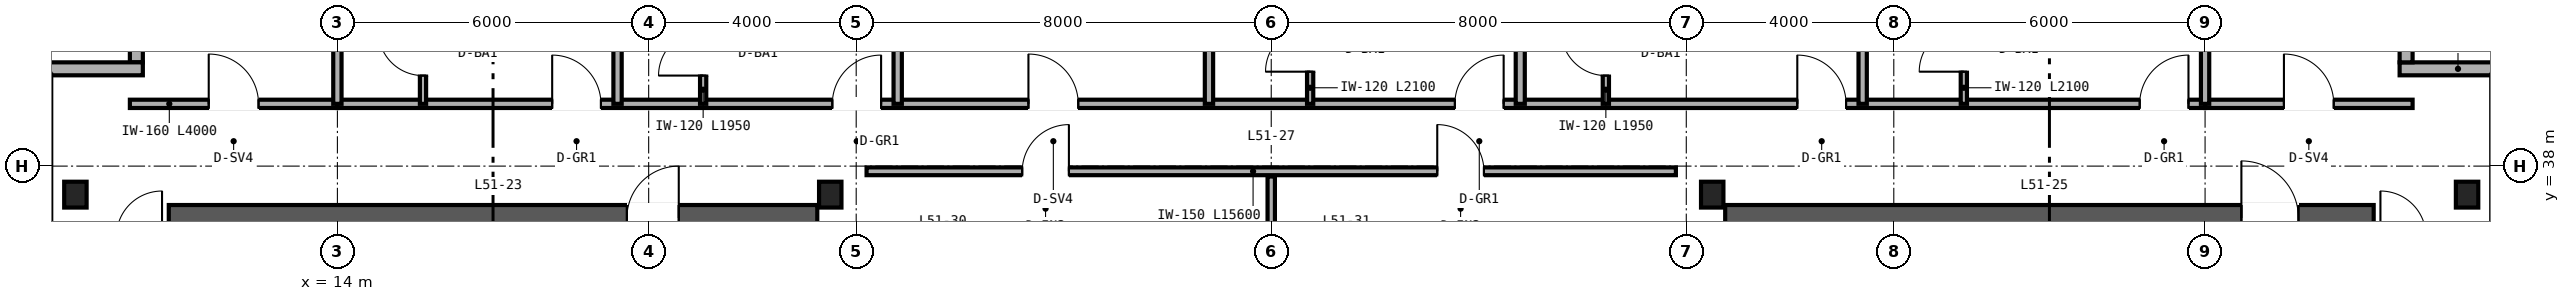
"""IFC4 building model, lengths in metres.
Left out: names, types, materials, properties, quantities, classifications, styles, units other than length and angle.
Written with IfcOpenShell. Run it as: python <this file> out.ifc"""

import sys

from ifc_helpers import new_model, si_unit, direction, frame, frame_2d, origin, origin_2d, place, context, subcontext, project, spatial, rectangle, i_section, extrude, source, transform, mapped, element, fill, save


model = new_model("IFC4")
c1 = context("Model", 3, precision=1e-05, world=origin(), true_north=direction((0.0, 1.0)))
c2 = subcontext(c1, "Body", "Model", "MODEL_VIEW")
j1 = project(units=[si_unit("LENGTHUNIT", "METRE"), si_unit("PLANEANGLEUNIT", "RADIAN")], contexts=[c1])
p1 = place(None, origin())
s1 = spatial("IfcSite", under=j1, at=p1, CompositionType="ELEMENT")
p2 = place(p1, origin())
s2 = spatial("IfcBuilding", under=s1, at=p2, CompositionType="ELEMENT")
p3 = place(p2, frame((0.0, 0.0, 202.8)))
s3 = spatial("IfcBuildingStorey", under=s2, at=p3, CompositionType="ELEMENT", Elevation=202.8)
p4 = place(p3, frame((10.75, 37.0, 0.0), z_axis=(0.0, 0.0, 1.0), x_axis=(1.0, 0.0, 0.0)))
e1 = element("IfcWall", 1, at=p4, inside=s3, PredefinedType="SHEAR", context=c2, shape_type="SweptSolid", body=[
    extrude(rectangle(XDim=12.5, YDim=0.5, at=frame_2d((6.25, 0.0))), origin(), (0.0, 0.0, 1.0), 3.37),
])
p5 = place(p4, frame((8.83, 0.0, 0.0)))
e2 = element("IfcOpeningElement", 2, at=p5, cuts=e1, PredefinedType="OPENING", context=c2, shape_type="SweptSolid", body=[
    extrude(rectangle(XDim=1.0, YDim=2.15, at=frame_2d((0.5, 1.075))), frame((0.0, 0.26, 0.0), z_axis=(0.0, -1.0, 0.0), x_axis=(1.0, 0.0, 0.0)), (0.0, 0.0, 1.0), 0.52),
])
p6 = place(p3, frame((40.75, 37.0, 0.0), z_axis=(0.0, 0.0, 1.0), x_axis=(1.0, 0.0, 0.0)))
e3 = element("IfcWall", 3, at=p6, inside=s3, PredefinedType="SHEAR", context=c2, shape_type="SweptSolid", body=[
    extrude(rectangle(XDim=12.5, YDim=0.5, at=frame_2d((6.25, 0.0))), origin(), (0.0, 0.0, 1.0), 3.37),
])
p7 = place(p6, frame((9.95, 0.0, 0.0)))
e4 = element("IfcOpeningElement", 4, at=p7, cuts=e3, PredefinedType="OPENING", context=c2, shape_type="SweptSolid", body=[
    extrude(rectangle(XDim=1.1, YDim=2.15, at=frame_2d((0.55, 1.075))), frame((0.0, 0.26, 0.0), z_axis=(0.0, -1.0, 0.0), x_axis=(1.0, 0.0, 0.0)), (0.0, 0.0, 1.0), 0.52),
])
m1 = source(origin(), c2, "Body", "SweptSolid", [
    extrude(i_section(OverallWidth=0.432, OverallDepth=0.498, WebThickness=0.056, FlangeThickness=0.089, FilletRadius=0.025, at=origin_2d()), origin(), (0.0, 0.0, 1.0), 3.37),
])
for number, where, z_axis, x_axis in (
    (5, (8.95, 37.45, 0.0), (0.0, 0.0, 1.0), (1.0, 0.0, 0.0)),
    (6, (23.5, 37.45, 0.0), (0.0, 0.0, 1.0), (1.0, 0.0, 0.0)),
    (7, (40.5, 37.45, 0.0), (0.0, 0.0, 1.0), (1.0, 0.0, 0.0)),
    (8, (55.05, 37.45, 0.0), (0.0, 0.0, 1.0), (1.0, 0.0, 0.0)),
):
    element("IfcColumn", number, at=place(p3, frame(where, z_axis=z_axis, x_axis=x_axis)), inside=s3, PredefinedType="COLUMN", context=c2, shape_type="MappedRepresentation", body=[
        mapped(m1, transform((0.0, 0.0, 0.0), scale=1.0)),
    ])
p8 = place(p3, frame((56.0, 39.875, 0.0), z_axis=(0.0, 0.0, 1.0), x_axis=(-1.0, 0.0, 0.0)))
e9 = element("IfcWall", 9, at=p8, inside=s3, PredefinedType="SOLIDWALL", context=c2, shape_type="SweptSolid", body=[
    extrude(rectangle(XDim=2.25, YDim=0.25, at=frame_2d((1.125, 0.0))), origin(), (0.0, 0.0, 1.0), 3.37),
])
for number, where, z_axis, x_axis in (
    (10, (53.875, 40.0, 0.0), (0.0, 0.0, 1.0), (0.0, 1.0, 0.0)),
    (11, (10.125, 42.0, 0.0), (0.0, 0.0, 1.0), (0.0, -1.0, 0.0)),
):
    element("IfcWall", number, at=place(p3, frame(where, z_axis=z_axis, x_axis=x_axis)), inside=s3, PredefinedType="SOLIDWALL", context=c2, shape_type="SweptSolid", body=[
        extrude(rectangle(XDim=2.0, YDim=0.25, at=frame_2d((1.0, 0.0))), origin(), (0.0, 0.0, 1.0), 3.37),
    ])
p9 = place(p3, frame((10.25, 39.875, 0.0), z_axis=(0.0, 0.0, 1.0), x_axis=(-1.0, 0.0, 0.0)))
e12 = element("IfcWall", 12, at=p9, inside=s3, PredefinedType="SOLIDWALL", context=c2, shape_type="SweptSolid", body=[
    extrude(rectangle(XDim=2.25, YDim=0.25, at=frame_2d((1.125, 0.0))), origin(), (0.0, 0.0, 1.0), 3.37),
])
p10 = place(p3, frame((24.2, 37.9, 0.0), z_axis=(0.0, 0.0, 1.0), x_axis=(1.0, 0.0, 0.0)))
e13 = element("IfcWall", 13, at=p10, inside=s3, PredefinedType="PARTITIONING", context=c2, shape_type="SweptSolid", body=[
    extrude(rectangle(XDim=15.6, YDim=0.15, at=frame_2d((7.8, 0.0))), origin(), (0.0, 0.0, 1.0), 3.37),
])
p11 = place(p10, frame((3.0, 0.0, 0.0)))
e14 = element("IfcOpeningElement", 14, at=p11, cuts=e13, PredefinedType="OPENING", context=c2, shape_type="SweptSolid", body=[
    extrude(rectangle(XDim=0.9, YDim=2.15, at=frame_2d((0.45, 1.075))), frame((0.0, 0.085, 0.0), z_axis=(0.0, -1.0, 0.0), x_axis=(1.0, 0.0, 0.0)), (0.0, 0.0, 1.0), 0.17),
])
p12 = place(p10, frame((11.0, 0.0, 0.0)))
e15 = element("IfcOpeningElement", 15, at=p12, cuts=e13, PredefinedType="OPENING", context=c2, shape_type="SweptSolid", body=[
    extrude(rectangle(XDim=0.9, YDim=2.15, at=frame_2d((0.45, 1.075))), frame((0.0, 0.085, 0.0), z_axis=(0.0, -1.0, 0.0), x_axis=(1.0, 0.0, 0.0)), (0.0, 0.0, 1.0), 0.17),
])
p13 = place(p3, frame((32.0, 36.12, 0.0), z_axis=(0.0, 0.0, 1.0), x_axis=(0.0, 1.0, 0.0)))
e16 = element("IfcWall", 16, at=p13, inside=s3, PredefinedType="PARTITIONING", context=c2, shape_type="SweptSolid", body=[
    extrude(rectangle(XDim=1.68, YDim=0.142, at=frame_2d((0.84, 0.0))), origin(), (0.0, 0.0, 1.0), 3.37),
])
p14 = place(p3, frame((10.0, 39.2, 0.0), z_axis=(0.0, 0.0, 1.0), x_axis=(1.0, 0.0, 0.0)))
e17 = element("IfcWall", 17, at=p14, inside=s3, PredefinedType="PARTITIONING", context=c2, shape_type="SweptSolid", body=[
    extrude(rectangle(XDim=4.0, YDim=0.16, at=frame_2d((2.0, 0.0))), origin(), (0.0, 0.0, 1.0), 3.37),
])
p15 = place(p14, frame((1.52, 0.0, 0.0)))
e18 = element("IfcOpeningElement", 18, at=p15, cuts=e17, PredefinedType="OPENING", context=c2, shape_type="SweptSolid", body=[
    extrude(rectangle(XDim=0.96, YDim=2.15, at=frame_2d((0.48, 1.075))), frame((0.0, 0.09, 0.0), z_axis=(0.0, -1.0, 0.0), x_axis=(1.0, 0.0, 0.0)), (0.0, 0.0, 1.0), 0.18),
])
p16 = place(p3, frame((50.0, 39.2, 0.0), z_axis=(0.0, 0.0, 1.0), x_axis=(1.0, 0.0, 0.0)))
e19 = element("IfcWall", 19, at=p16, inside=s3, PredefinedType="PARTITIONING", context=c2, shape_type="SweptSolid", body=[
    extrude(rectangle(XDim=4.0, YDim=0.16, at=frame_2d((2.0, 0.0))), origin(), (0.0, 0.0, 1.0), 3.37),
])
p17 = place(p16, frame((1.52, 0.0, 0.0)))
e20 = element("IfcOpeningElement", 20, at=p17, cuts=e19, PredefinedType="OPENING", context=c2, shape_type="SweptSolid", body=[
    extrude(rectangle(XDim=0.96, YDim=2.15, at=frame_2d((0.48, 1.075))), frame((0.0, 0.09, 0.0), z_axis=(0.0, -1.0, 0.0), x_axis=(1.0, 0.0, 0.0)), (0.0, 0.0, 1.0), 0.18),
])
p18 = place(p3, frame((14.0, 39.2, 0.0), z_axis=(0.0, 0.0, 1.0), x_axis=(1.0, 0.0, 0.0)))
e21 = element("IfcWall", 21, at=p18, inside=s3, PredefinedType="PARTITIONING", context=c2, shape_type="SweptSolid", body=[
    extrude(rectangle(XDim=36.0, YDim=0.16, at=frame_2d((18.0, 0.0))), origin(), (0.0, 0.0, 1.0), 2.913),
])
p19 = place(p18, frame((4.14, 0.0, 0.0)))
e22 = element("IfcOpeningElement", 22, at=p19, cuts=e21, PredefinedType="OPENING", context=c2, shape_type="SweptSolid", body=[
    extrude(rectangle(XDim=0.94, YDim=2.15, at=frame_2d((0.47, 1.075))), frame((0.0, 0.09, 0.0), z_axis=(0.0, -1.0, 0.0), x_axis=(1.0, 0.0, 0.0)), (0.0, 0.0, 1.0), 0.18),
])
p20 = place(p18, frame((9.54, 0.0, 0.0)))
e23 = element("IfcOpeningElement", 23, at=p20, cuts=e21, PredefinedType="OPENING", context=c2, shape_type="SweptSolid", body=[
    extrude(rectangle(XDim=0.94, YDim=2.15, at=frame_2d((0.47, 1.075))), frame((0.0, 0.09, 0.0), z_axis=(0.0, -1.0, 0.0), x_axis=(1.0, 0.0, 0.0)), (0.0, 0.0, 1.0), 0.18),
])
p21 = place(p18, frame((13.32, 0.0, 0.0)))
e24 = element("IfcOpeningElement", 24, at=p21, cuts=e21, PredefinedType="OPENING", context=c2, shape_type="SweptSolid", body=[
    extrude(rectangle(XDim=0.96, YDim=2.15, at=frame_2d((0.48, 1.075))), frame((0.0, 0.09, 0.0), z_axis=(0.0, -1.0, 0.0), x_axis=(1.0, 0.0, 0.0)), (0.0, 0.0, 1.0), 0.18),
])
p22 = place(p18, frame((21.54, 0.0, 0.0)))
e25 = element("IfcOpeningElement", 25, at=p22, cuts=e21, PredefinedType="OPENING", context=c2, shape_type="SweptSolid", body=[
    extrude(rectangle(XDim=0.94, YDim=2.15, at=frame_2d((0.47, 1.075))), frame((0.0, 0.09, 0.0), z_axis=(0.0, -1.0, 0.0), x_axis=(1.0, 0.0, 0.0)), (0.0, 0.0, 1.0), 0.18),
])
p23 = place(p18, frame((28.14, 0.0, 0.0)))
e26 = element("IfcOpeningElement", 26, at=p23, cuts=e21, PredefinedType="OPENING", context=c2, shape_type="SweptSolid", body=[
    extrude(rectangle(XDim=0.94, YDim=2.15, at=frame_2d((0.47, 1.075))), frame((0.0, 0.09, 0.0), z_axis=(0.0, -1.0, 0.0), x_axis=(1.0, 0.0, 0.0)), (0.0, 0.0, 1.0), 0.18),
])
p24 = place(p18, frame((34.74, 0.0, 0.0)))
e27 = element("IfcOpeningElement", 27, at=p24, cuts=e21, PredefinedType="OPENING", context=c2, shape_type="SweptSolid", body=[
    extrude(rectangle(XDim=0.94, YDim=2.15, at=frame_2d((0.47, 1.075))), frame((0.0, 0.09, 0.0), z_axis=(0.0, -1.0, 0.0), x_axis=(1.0, 0.0, 0.0)), (0.0, 0.0, 1.0), 0.18),
])
for number, where, z_axis, x_axis in (
    (28, (14.0, 39.2, 0.0), (0.0, 0.0, 1.0), (0.0, 1.0, 0.0)),
    (29, (50.0, 39.2, 0.0), (0.0, 0.0, 1.0), (0.0, 1.0, 0.0)),
    (30, (19.4, 39.2, 0.0), (0.0, 0.0, 1.0), (0.0, 1.0, 0.0)),
):
    element("IfcWall", number, at=place(p3, frame(where, z_axis=z_axis, x_axis=x_axis)), inside=s3, PredefinedType="PARTITIONING", context=c2, shape_type="SweptSolid", body=[
        extrude(rectangle(XDim=6.44, YDim=0.16, at=frame_2d((3.22, 0.0))), origin(), (0.0, 0.0, 1.0), 2.677),
    ])
p25 = place(p3, frame((15.65, 39.2, 0.0), z_axis=(0.0, 0.0, 1.0), x_axis=(0.0, 1.0, 0.0)))
e31 = element("IfcWall", 31, at=p25, inside=s3, PredefinedType="PARTITIONING", context=c2, shape_type="SweptSolid", body=[
    extrude(rectangle(XDim=1.95, YDim=0.12, at=frame_2d((0.975, 0.0))), origin(), (0.0, 0.0, 1.0), 3.37),
])
p26 = place(p25, frame((0.545, 0.0, 0.0)))
e32 = element("IfcOpeningElement", 32, at=p26, cuts=e31, PredefinedType="OPENING", context=c2, shape_type="SweptSolid", body=[
    extrude(rectangle(XDim=0.86, YDim=2.1, at=frame_2d((0.43, 1.05))), frame((0.0, 0.07, 0.0), z_axis=(0.0, -1.0, 0.0), x_axis=(1.0, 0.0, 0.0)), (0.0, 0.0, 1.0), 0.14),
])
p27 = place(p3, frame((24.8, 39.2, 0.0), z_axis=(0.0, 0.0, 1.0), x_axis=(0.0, 1.0, 0.0)))
e33 = element("IfcWall", 33, at=p27, inside=s3, PredefinedType="PARTITIONING", context=c2, shape_type="SweptSolid", body=[
    extrude(rectangle(XDim=6.44, YDim=0.16, at=frame_2d((3.22, 0.0))), origin(), (0.0, 0.0, 1.0), 2.443),
])
p28 = place(p3, frame((21.05, 39.2, 0.0), z_axis=(0.0, 0.0, 1.0), x_axis=(0.0, 1.0, 0.0)))
e34 = element("IfcWall", 34, at=p28, inside=s3, PredefinedType="PARTITIONING", context=c2, shape_type="SweptSolid", body=[
    extrude(rectangle(XDim=1.95, YDim=0.12, at=frame_2d((0.975, 0.0))), origin(), (0.0, 0.0, 1.0), 3.37),
])
p29 = place(p28, frame((0.545, 0.0, 0.0)))
e35 = element("IfcOpeningElement", 35, at=p29, cuts=e34, PredefinedType="OPENING", context=c2, shape_type="SweptSolid", body=[
    extrude(rectangle(XDim=0.86, YDim=2.1, at=frame_2d((0.43, 1.05))), frame((0.0, 0.07, 0.0), z_axis=(0.0, -1.0, 0.0), x_axis=(1.0, 0.0, 0.0)), (0.0, 0.0, 1.0), 0.14),
])
p30 = place(p3, frame((30.8, 39.2, 0.0), z_axis=(0.0, 0.0, 1.0), x_axis=(0.0, 1.0, 0.0)))
e36 = element("IfcWall", 36, at=p30, inside=s3, PredefinedType="PARTITIONING", context=c2, shape_type="SweptSolid", body=[
    extrude(rectangle(XDim=6.44, YDim=0.16, at=frame_2d((3.22, 0.0))), origin(), (0.0, 0.0, 1.0), 2.443),
])
p31 = place(p3, frame((36.8, 39.2, 0.0), z_axis=(0.0, 0.0, 1.0), x_axis=(0.0, 1.0, 0.0)))
e37 = element("IfcWall", 37, at=p31, inside=s3, PredefinedType="PARTITIONING", context=c2, shape_type="SweptSolid", body=[
    extrude(rectangle(XDim=6.44, YDim=0.175, at=frame_2d((3.22, 0.0))), origin(), (0.0, 0.0, 1.0), 2.443),
])
p32 = place(p3, frame((32.75, 39.2, 0.0), z_axis=(0.0, 0.0, 1.0), x_axis=(0.0, 1.0, 0.0)))
e38 = element("IfcWall", 38, at=p32, inside=s3, PredefinedType="PARTITIONING", context=c2, shape_type="SweptSolid", body=[
    extrude(rectangle(XDim=2.1, YDim=0.12, at=frame_2d((1.05, 0.0))), origin(), (0.0, 0.0, 1.0), 3.37),
])
p33 = place(p32, frame((0.62, 0.0, 0.0)))
e39 = element("IfcOpeningElement", 39, at=p33, cuts=e38, PredefinedType="OPENING", context=c2, shape_type="SweptSolid", body=[
    extrude(rectangle(XDim=0.86, YDim=2.1, at=frame_2d((0.43, 1.05))), frame((0.0, 0.07, 0.0), z_axis=(0.0, -1.0, 0.0), x_axis=(1.0, 0.0, 0.0)), (0.0, 0.0, 1.0), 0.14),
])
p34 = place(p3, frame((43.4, 39.2, 0.0), z_axis=(0.0, 0.0, 1.0), x_axis=(0.0, 1.0, 0.0)))
e40 = element("IfcWall", 40, at=p34, inside=s3, PredefinedType="PARTITIONING", context=c2, shape_type="SweptSolid", body=[
    extrude(rectangle(XDim=6.44, YDim=0.16, at=frame_2d((3.22, 0.0))), origin(), (0.0, 0.0, 1.0), 2.833),
])
p35 = place(p3, frame((38.45, 39.2, 0.0), z_axis=(0.0, 0.0, 1.0), x_axis=(0.0, 1.0, 0.0)))
e41 = element("IfcWall", 41, at=p35, inside=s3, PredefinedType="PARTITIONING", context=c2, shape_type="SweptSolid", body=[
    extrude(rectangle(XDim=1.95, YDim=0.12, at=frame_2d((0.975, 0.0))), origin(), (0.0, 0.0, 1.0), 3.37),
])
p36 = place(p35, frame((0.545, 0.0, 0.0)))
e42 = element("IfcOpeningElement", 42, at=p36, cuts=e41, PredefinedType="OPENING", context=c2, shape_type="SweptSolid", body=[
    extrude(rectangle(XDim=0.86, YDim=2.1, at=frame_2d((0.43, 1.05))), frame((0.0, 0.07, 0.0), z_axis=(0.0, -1.0, 0.0), x_axis=(1.0, 0.0, 0.0)), (0.0, 0.0, 1.0), 0.14),
])
p37 = place(p3, frame((45.35, 39.2, 0.0), z_axis=(0.0, 0.0, 1.0), x_axis=(0.0, 1.0, 0.0)))
e43 = element("IfcWall", 43, at=p37, inside=s3, PredefinedType="PARTITIONING", context=c2, shape_type="SweptSolid", body=[
    extrude(rectangle(XDim=2.1, YDim=0.12, at=frame_2d((1.05, 0.0))), origin(), (0.0, 0.0, 1.0), 3.37),
])
p38 = place(p37, frame((0.62, 0.0, 0.0)))
e44 = element("IfcOpeningElement", 44, at=p38, cuts=e43, PredefinedType="OPENING", context=c2, shape_type="SweptSolid", body=[
    extrude(rectangle(XDim=0.86, YDim=2.1, at=frame_2d((0.43, 1.05))), frame((0.0, 0.07, 0.0), z_axis=(0.0, -1.0, 0.0), x_axis=(1.0, 0.0, 0.0)), (0.0, 0.0, 1.0), 0.14),
])
m2 = source(origin(), c2, "Body", "SweptSolid", [
    extrude(rectangle(XDim=1.0, YDim=2.15, at=frame_2d((0.5, 1.075))), frame((0.0, 0.025, 0.0), z_axis=(0.0, -1.0, 0.0), x_axis=(1.0, 0.0, 0.0)), (0.0, 0.0, 1.0), 0.05),
])
p39 = place(p5, origin())
e45 = element("IfcDoor", 45, at=p39, inside=s3, OperationType="SINGLE_SWING_RIGHT", PredefinedType="DOOR", context=c2, shape_type="MappedRepresentation", body=[
    mapped(m2, transform((0.0, 0.0, 0.0), scale=1.0)),
])
fill(e2, e45)
m3 = source(origin(), c2, "Body", "SweptSolid", [
    extrude(rectangle(XDim=1.1, YDim=2.15, at=frame_2d((0.55, 1.075))), frame((0.0, 0.025, 0.0), z_axis=(0.0, -1.0, 0.0), x_axis=(1.0, 0.0, 0.0)), (0.0, 0.0, 1.0), 0.05),
])
p40 = place(p7, origin())
e46 = element("IfcDoor", 46, at=p40, inside=s3, OperationType="SINGLE_SWING_LEFT", PredefinedType="DOOR", context=c2, shape_type="MappedRepresentation", body=[
    mapped(m3, transform((0.0, 0.0, 0.0), scale=1.0)),
])
fill(e4, e46)
m4 = source(origin(), c2, "Body", "SweptSolid", [
    extrude(rectangle(XDim=0.9, YDim=2.15, at=frame_2d((0.45, 1.075))), frame((0.0, 0.025, 0.0), z_axis=(0.0, -1.0, 0.0), x_axis=(1.0, 0.0, 0.0)), (0.0, 0.0, 1.0), 0.05),
])
p41 = place(p11, origin())
e47 = element("IfcDoor", 47, at=p41, inside=s3, OperationType="SINGLE_SWING_RIGHT", PredefinedType="DOOR", context=c2, shape_type="MappedRepresentation", body=[
    mapped(m4, transform((0.0, 0.0, 0.0), scale=1.0)),
])
fill(e14, e47)
p42 = place(p12, origin())
e48 = element("IfcDoor", 48, at=p42, inside=s3, OperationType="SINGLE_SWING_LEFT", PredefinedType="DOOR", context=c2, shape_type="MappedRepresentation", body=[
    mapped(m4, transform((0.0, 0.0, 0.0), scale=1.0)),
])
fill(e15, e48)
m5 = source(origin(), c2, "Body", "SweptSolid", [
    extrude(rectangle(XDim=0.96, YDim=2.15, at=frame_2d((0.48, 1.075))), frame((0.0, 0.025, 0.0), z_axis=(0.0, -1.0, 0.0), x_axis=(1.0, 0.0, 0.0)), (0.0, 0.0, 1.0), 0.05),
])
p43 = place(p15, origin())
e49 = element("IfcDoor", 49, at=p43, inside=s3, OperationType="SINGLE_SWING_LEFT", PredefinedType="DOOR", context=c2, shape_type="MappedRepresentation", body=[
    mapped(m5, transform((0.0, 0.0, 0.0), scale=1.0)),
])
fill(e18, e49)
p44 = place(p17, origin())
e50 = element("IfcDoor", 50, at=p44, inside=s3, OperationType="SINGLE_SWING_LEFT", PredefinedType="DOOR", context=c2, shape_type="MappedRepresentation", body=[
    mapped(m5, transform((0.0, 0.0, 0.0), scale=1.0)),
])
fill(e20, e50)
m6 = source(origin(), c2, "Body", "SweptSolid", [
    extrude(rectangle(XDim=0.86, YDim=2.1, at=frame_2d((0.43, 1.05))), frame((0.0, 0.025, 0.0), z_axis=(0.0, -1.0, 0.0), x_axis=(1.0, 0.0, 0.0)), (0.0, 0.0, 1.0), 0.05),
])
p45 = place(p26, origin())
e51 = element("IfcDoor", 51, at=p45, inside=s3, OperationType="SINGLE_SWING_RIGHT", PredefinedType="DOOR", context=c2, shape_type="MappedRepresentation", body=[
    mapped(m6, transform((0.0, 0.0, 0.0), scale=1.0)),
])
fill(e32, e51)
p46 = place(p29, origin())
e52 = element("IfcDoor", 52, at=p46, inside=s3, OperationType="SINGLE_SWING_LEFT", PredefinedType="DOOR", context=c2, shape_type="MappedRepresentation", body=[
    mapped(m6, transform((0.0, 0.0, 0.0), scale=1.0)),
])
fill(e35, e52)
p47 = place(p33, origin())
e53 = element("IfcDoor", 53, at=p47, inside=s3, OperationType="SINGLE_SWING_LEFT", PredefinedType="DOOR", context=c2, shape_type="MappedRepresentation", body=[
    mapped(m6, transform((0.0, 0.0, 0.0), scale=1.0)),
])
fill(e39, e53)
p48 = place(p36, origin())
e54 = element("IfcDoor", 54, at=p48, inside=s3, OperationType="SINGLE_SWING_RIGHT", PredefinedType="DOOR", context=c2, shape_type="MappedRepresentation", body=[
    mapped(m6, transform((0.0, 0.0, 0.0), scale=1.0)),
])
fill(e42, e54)
p49 = place(p38, origin())
e55 = element("IfcDoor", 55, at=p49, inside=s3, OperationType="SINGLE_SWING_LEFT", PredefinedType="DOOR", context=c2, shape_type="MappedRepresentation", body=[
    mapped(m6, transform((0.0, 0.0, 0.0), scale=1.0)),
])
fill(e44, e55)
m7 = source(origin(), c2, "Body", "SweptSolid", [
    extrude(rectangle(XDim=0.94, YDim=2.15, at=frame_2d((0.47, 1.075))), frame((0.0, 0.025, 0.0), z_axis=(0.0, -1.0, 0.0), x_axis=(1.0, 0.0, 0.0)), (0.0, 0.0, 1.0), 0.05),
])
p50 = place(p19, origin())
e56 = element("IfcDoor", 56, at=p50, inside=s3, OperationType="SINGLE_SWING_LEFT", PredefinedType="DOOR", context=c2, shape_type="MappedRepresentation", body=[
    mapped(m7, transform((0.0, 0.0, 0.0), scale=1.0)),
])
fill(e22, e56)
p51 = place(p20, origin())
e57 = element("IfcDoor", 57, at=p51, inside=s3, OperationType="SINGLE_SWING_RIGHT", PredefinedType="DOOR", context=c2, shape_type="MappedRepresentation", body=[
    mapped(m7, transform((0.0, 0.0, 0.0), scale=1.0)),
])
fill(e23, e57)
p52 = place(p21, origin())
e58 = element("IfcDoor", 58, at=p52, inside=s3, OperationType="SINGLE_SWING_LEFT", PredefinedType="DOOR", context=c2, shape_type="MappedRepresentation", body=[
    mapped(m5, transform((0.0, 0.0, 0.0), scale=1.0)),
])
fill(e24, e58)
p53 = place(p22, origin())
e59 = element("IfcDoor", 59, at=p53, inside=s3, OperationType="SINGLE_SWING_RIGHT", PredefinedType="DOOR", context=c2, shape_type="MappedRepresentation", body=[
    mapped(m7, transform((0.0, 0.0, 0.0), scale=1.0)),
])
fill(e25, e59)
p54 = place(p23, origin())
e60 = element("IfcDoor", 60, at=p54, inside=s3, OperationType="SINGLE_SWING_LEFT", PredefinedType="DOOR", context=c2, shape_type="MappedRepresentation", body=[
    mapped(m7, transform((0.0, 0.0, 0.0), scale=1.0)),
])
fill(e26, e60)
p55 = place(p24, origin())
e61 = element("IfcDoor", 61, at=p55, inside=s3, OperationType="SINGLE_SWING_RIGHT", PredefinedType="DOOR", context=c2, shape_type="MappedRepresentation", body=[
    mapped(m7, transform((0.0, 0.0, 0.0), scale=1.0)),
])
fill(e27, e61)
save(model, sys.argv[1])
